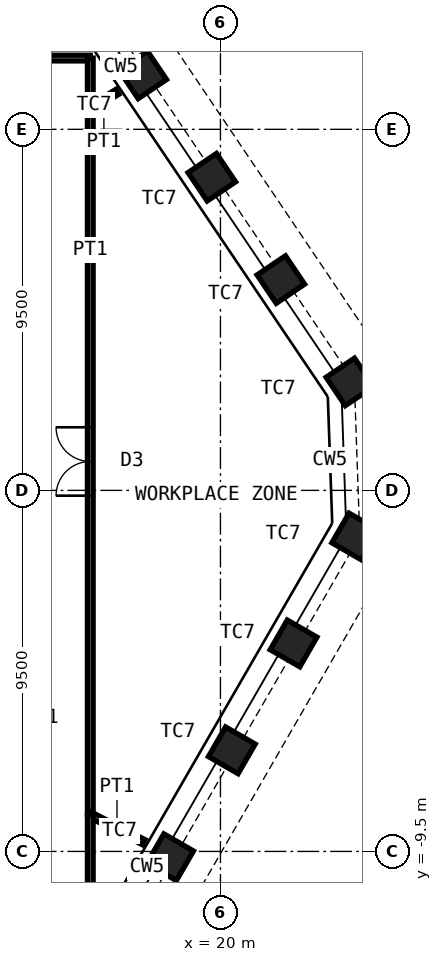
"""IFC4 building model, lengths in metres.
Left out: names, types, materials, properties, quantities, classifications, styles, units other than length and angle.
Written with IfcOpenShell. Run it as: python <this file> out.ifc"""

import sys

from ifc_helpers import new_model, si_unit, direction, frame, frame_2d, origin, origin_2d, place, context, subcontext, project, spatial, rectangle, hollow_rectangle, extrude, element, fill, save


model = new_model("IFC4")
c1 = context("Model", 3, precision=1e-05, world=origin(), true_north=direction((0.0, 1.0)))
c2 = subcontext(c1, "Body", "Model", "MODEL_VIEW")
j1 = project(units=[si_unit("LENGTHUNIT", "METRE"), si_unit("PLANEANGLEUNIT", "RADIAN")], contexts=[c1])
p1 = place(None, origin())
s1 = spatial("IfcSite", under=j1, at=p1, CompositionType="ELEMENT")
p2 = place(p1, origin())
s2 = spatial("IfcBuilding", under=s1, at=p2, CompositionType="ELEMENT")
p3 = place(p2, frame((0.0, 0.0, 299.8)))
s3 = spatial("IfcBuildingStorey", under=s2, at=p3, CompositionType="ELEMENT", Elevation=299.8)
for number, where, z_axis, x_axis in (
    (1, (17.957, 10.932, 0.0), (0.0, 0.0, 1.0), (-0.559, 0.829, 0.0)),
    (2, (19.773, 8.239, 0.0), (0.0, 0.0, 1.0), (-0.559, 0.829, 0.0)),
    (3, (21.589, 5.547, 0.0), (0.0, 0.0, 1.0), (-0.559, 0.829, 0.0)),
    (4, (23.406, 2.854, 0.0), (0.0, 0.0, 1.0), (-0.559, 0.829, 0.0)),
    (5, (23.548, -1.214, 0.0), (0.0, 0.0, 1.0), (0.5, 0.866, 0.0)),
    (6, (21.924, -4.027, 0.0), (0.0, 0.0, 1.0), (0.5, 0.866, 0.0)),
    (7, (20.3, -6.84, 0.0), (0.0, 0.0, 1.0), (0.5, 0.866, 0.0)),
    (8, (18.676, -9.653, 0.0), (0.0, 0.0, 1.0), (0.5, 0.866, 0.0)),
):
    element("IfcColumn", number, at=place(p3, frame(where, z_axis=z_axis, x_axis=x_axis)), inside=s3, PredefinedType="COLUMN", context=c2, shape_type="SweptSolid", body=[
        extrude(hollow_rectangle(XDim=0.9, YDim=0.9, WallThickness=0.06, at=origin_2d()), origin(), (0.0, 0.0, 1.0), 4.2),
    ])
p4 = place(p3, frame((13.375, 11.375, 0.0), z_axis=(0.0, 0.0, 1.0), x_axis=(1.0, 0.0, 0.0)))
e9 = element("IfcWall", 9, at=p4, inside=s3, PredefinedType="PARTITIONING", context=c2, shape_type="SweptSolid", body=[
    extrude(rectangle(XDim=3.2, YDim=0.15, at=frame_2d((1.6, 0.0))), origin(), (0.0, 0.0, 1.0), 4.03),
])
p5 = place(p4, frame((1.1, 0.0, 0.0)))
e10 = element("IfcOpeningElement", 10, at=p5, cuts=e9, PredefinedType="OPENING", context=c2, shape_type="SweptSolid", body=[
    extrude(rectangle(XDim=1.0, YDim=2.4, at=frame_2d((0.5, 1.2))), frame((0.0, 0.085, 0.0), z_axis=(0.0, -1.0, 0.0), x_axis=(1.0, 0.0, 0.0)), (0.0, 0.0, 1.0), 0.17),
])
p6 = place(p3, frame((16.575, 11.375, 0.0), z_axis=(0.0, 0.0, 1.0), x_axis=(0.0, -1.0, 0.0)))
e11 = element("IfcWall", 11, at=p6, inside=s3, PredefinedType="PARTITIONING", context=c2, shape_type="SweptSolid", body=[
    extrude(rectangle(XDim=1.321, YDim=0.15, at=frame_2d((0.66, 0.0))), origin(), (0.0, 0.0, 1.0), 4.03),
])
p7 = place(p3, frame((17.291, 10.489, 0.0), z_axis=(0.0, 0.0, 1.0), x_axis=(-0.855013745288, -0.518605336811, 0.0)))
e12 = element("IfcWall", 12, at=p7, inside=s3, PredefinedType="PARTITIONING", context=c2, shape_type="SweptSolid", body=[
    extrude(rectangle(XDim=0.837, YDim=0.15, at=frame_2d((0.419, 0.0))), origin(), (0.0, 0.0, 1.0), 2.93),
])
p8 = place(p3, frame((16.575, 10.054, 0.0), z_axis=(0.0, 0.0, 1.0), x_axis=(0.0, -1.0, 0.0)))
e13 = element("IfcWall", 13, at=p8, inside=s3, PredefinedType="PARTITIONING", context=c2, shape_type="SweptSolid", body=[
    extrude(rectangle(XDim=18.588, YDim=0.15, at=frame_2d((9.294, 0.0))), origin(), (0.0, 0.0, 1.0), 4.03),
])
p9 = place(p8, frame((8.394, 0.0, 0.0)))
e14 = element("IfcOpeningElement", 14, at=p9, cuts=e13, PredefinedType="OPENING", context=c2, shape_type="SweptSolid", body=[
    extrude(rectangle(XDim=1.8, YDim=2.4, at=frame_2d((0.9, 1.2))), frame((0.0, 0.085, 0.0), z_axis=(0.0, -1.0, 0.0), x_axis=(1.0, 0.0, 0.0)), (0.0, 0.0, 1.0), 0.17),
])
p10 = place(p3, frame((17.98, -9.257, 0.0), z_axis=(0.0, 0.0, 1.0), x_axis=(-0.88908312915, 0.457745769463, 0.0)))
e15 = element("IfcWall", 15, at=p10, inside=s3, PredefinedType="PARTITIONING", context=c2, shape_type="SweptSolid", body=[
    extrude(rectangle(XDim=1.581, YDim=0.15, at=frame_2d((0.791, 0.0))), origin(), (0.0, 0.0, 1.0), 2.93),
])
p11 = place(p3, frame((16.575, -8.533, 0.0), z_axis=(0.0, 0.0, 1.0), x_axis=(0.0, -1.0, 0.0)))
e16 = element("IfcWall", 16, at=p11, inside=s3, PredefinedType="PARTITIONING", context=c2, shape_type="SweptSolid", body=[
    extrude(rectangle(XDim=2.842, YDim=0.15, at=frame_2d((1.421, 0.0))), origin(), (0.0, 0.0, 1.0), 4.03),
])
p12 = place(p9, origin())
e17 = element("IfcDoor", 17, at=p12, inside=s3, OperationType="DOUBLE_DOOR_DOUBLE_SWING", PredefinedType="DOOR", context=c2, shape_type="SweptSolid", body=[
    extrude(rectangle(XDim=1.8, YDim=2.4, at=frame_2d((0.9, 1.2))), frame((0.0, 0.025, 0.0), z_axis=(0.0, -1.0, 0.0), x_axis=(1.0, 0.0, 0.0)), (0.0, 0.0, 1.0), 0.05),
])
fill(e14, e17)
save(model, sys.argv[1])
